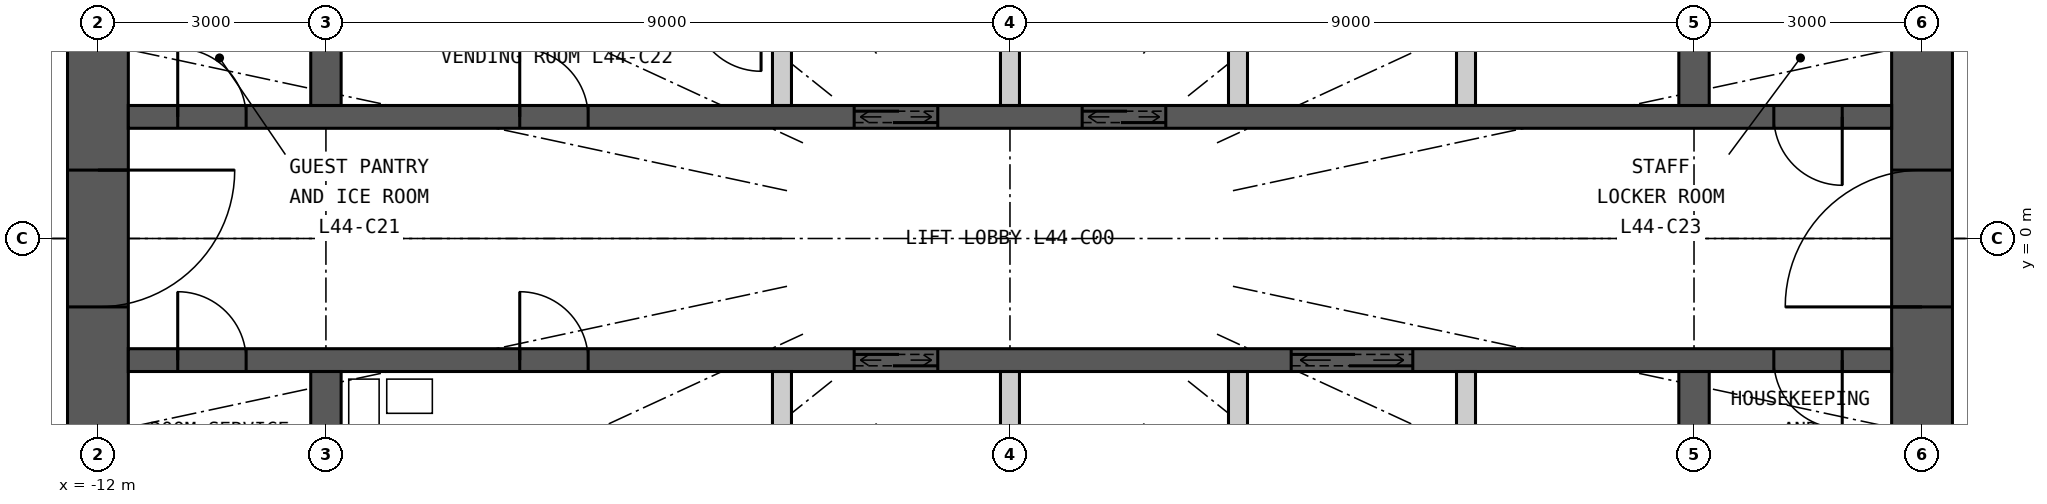
"""IFC4 building model, lengths in metres.
Left out: names, types, materials, properties, quantities, classifications, styles, units other than length and angle.
Written with IfcOpenShell. Run it as: python <this file> out.ifc"""

import sys

from ifc_helpers import new_model, si_unit, direction, frame, frame_2d, origin, place, context, subcontext, project, spatial, rectangle, extrude, element, fill, save


model = new_model("IFC4")
c1 = context("Model", 3, precision=1e-05, world=origin(), true_north=direction((0.0, 1.0)))
c2 = subcontext(c1, "Body", "Model", "MODEL_VIEW")
j1 = project(units=[si_unit("LENGTHUNIT", "METRE"), si_unit("PLANEANGLEUNIT", "RADIAN")], contexts=[c1])
p1 = place(None, origin())
s1 = spatial("IfcSite", under=j1, at=p1, CompositionType="ELEMENT")
p2 = place(p1, origin())
s2 = spatial("IfcBuilding", under=s1, at=p2, CompositionType="ELEMENT")
p3 = place(p2, frame((0.0, 0.0, 166.5)))
s3 = spatial("IfcBuildingStorey", under=s2, at=p3, CompositionType="ELEMENT", Elevation=166.5)
p4 = place(p3, frame((12.0, -7.6, 0.0), z_axis=(0.0, 0.0, 1.0), x_axis=(0.0, 1.0, 0.0)))
e1 = element("IfcWall", 1, at=p4, inside=s3, PredefinedType="SHEAR", context=c2, shape_type="SweptSolid", body=[
    extrude(rectangle(XDim=15.2, YDim=0.8, at=frame_2d((7.6, 0.0))), origin(), (0.0, 0.0, 1.0), 3.3),
])
p5 = place(p4, frame((6.7, 0.0, 0.0)))
e2 = element("IfcOpeningElement", 2, at=p5, cuts=e1, PredefinedType="OPENING", context=c2, shape_type="SweptSolid", body=[
    extrude(rectangle(XDim=1.8, YDim=2.2, at=frame_2d((0.9, 1.1))), frame((0.0, 0.41, 0.0), z_axis=(0.0, -1.0, 0.0), x_axis=(1.0, 0.0, 0.0)), (0.0, 0.0, 1.0), 0.82),
])
p6 = place(p3, frame((-12.0, 7.6, 0.0), z_axis=(0.0, 0.0, 1.0), x_axis=(0.0, -1.0, 0.0)))
e3 = element("IfcWall", 3, at=p6, inside=s3, PredefinedType="SHEAR", context=c2, shape_type="SweptSolid", body=[
    extrude(rectangle(XDim=15.2, YDim=0.8, at=frame_2d((7.6, 0.0))), origin(), (0.0, 0.0, 1.0), 3.3),
])
p7 = place(p6, frame((6.7, 0.0, 0.0)))
e4 = element("IfcOpeningElement", 4, at=p7, cuts=e3, PredefinedType="OPENING", context=c2, shape_type="SweptSolid", body=[
    extrude(rectangle(XDim=1.8, YDim=2.2, at=frame_2d((0.9, 1.1))), frame((0.0, 0.41, 0.0), z_axis=(0.0, -1.0, 0.0), x_axis=(1.0, 0.0, 0.0)), (0.0, 0.0, 1.0), 0.82),
])
p8 = place(p3, frame((-11.6, 1.6, 0.0), z_axis=(0.0, 0.0, 1.0), x_axis=(1.0, 0.0, 0.0)))
e5 = element("IfcWall", 5, at=p8, inside=s3, PredefinedType="SHEAR", context=c2, shape_type="SweptSolid", body=[
    extrude(rectangle(XDim=23.2, YDim=0.3, at=frame_2d((11.6, 0.0))), origin(), (0.0, 0.0, 1.0), 3.3),
])
p9 = place(p8, frame((9.55, 0.0, 0.0)))
e6 = element("IfcOpeningElement", 6, at=p9, cuts=e5, PredefinedType="OPENING", context=c2, shape_type="SweptSolid", body=[
    extrude(rectangle(XDim=1.1, YDim=2.2, at=frame_2d((0.55, 1.1))), frame((0.0, 0.16, 0.0), z_axis=(0.0, -1.0, 0.0), x_axis=(1.0, 0.0, 0.0)), (0.0, 0.0, 1.0), 0.32),
])
p10 = place(p8, frame((12.55, 0.0, 0.0)))
e7 = element("IfcOpeningElement", 7, at=p10, cuts=e5, PredefinedType="OPENING", context=c2, shape_type="SweptSolid", body=[
    extrude(rectangle(XDim=1.1, YDim=2.2, at=frame_2d((0.55, 1.1))), frame((0.0, 0.16, 0.0), z_axis=(0.0, -1.0, 0.0), x_axis=(1.0, 0.0, 0.0)), (0.0, 0.0, 1.0), 0.32),
])
p11 = place(p8, frame((0.65, 0.0, 0.0)))
e8 = element("IfcOpeningElement", 8, at=p11, cuts=e5, PredefinedType="OPENING", context=c2, shape_type="SweptSolid", body=[
    extrude(rectangle(XDim=0.9, YDim=2.2, at=frame_2d((0.45, 1.1))), frame((0.0, 0.16, 0.0), z_axis=(0.0, -1.0, 0.0), x_axis=(1.0, 0.0, 0.0)), (0.0, 0.0, 1.0), 0.32),
])
p12 = place(p8, frame((5.15, 0.0, 0.0)))
e9 = element("IfcOpeningElement", 9, at=p12, cuts=e5, PredefinedType="OPENING", context=c2, shape_type="SweptSolid", body=[
    extrude(rectangle(XDim=0.9, YDim=2.2, at=frame_2d((0.45, 1.1))), frame((0.0, 0.16, 0.0), z_axis=(0.0, -1.0, 0.0), x_axis=(1.0, 0.0, 0.0)), (0.0, 0.0, 1.0), 0.32),
])
p13 = place(p8, frame((21.65, 0.0, 0.0)))
e10 = element("IfcOpeningElement", 10, at=p13, cuts=e5, PredefinedType="OPENING", context=c2, shape_type="SweptSolid", body=[
    extrude(rectangle(XDim=0.9, YDim=2.2, at=frame_2d((0.45, 1.1))), frame((0.0, 0.16, 0.0), z_axis=(0.0, -1.0, 0.0), x_axis=(1.0, 0.0, 0.0)), (0.0, 0.0, 1.0), 0.32),
])
p14 = place(p3, frame((-11.6, -1.6, 0.0), z_axis=(0.0, 0.0, 1.0), x_axis=(1.0, 0.0, 0.0)))
e11 = element("IfcWall", 11, at=p14, inside=s3, PredefinedType="SHEAR", context=c2, shape_type="SweptSolid", body=[
    extrude(rectangle(XDim=23.2, YDim=0.3, at=frame_2d((11.6, 0.0))), origin(), (0.0, 0.0, 1.0), 3.3),
])
p15 = place(p14, frame((9.55, 0.0, 0.0)))
e12 = element("IfcOpeningElement", 12, at=p15, cuts=e11, PredefinedType="OPENING", context=c2, shape_type="SweptSolid", body=[
    extrude(rectangle(XDim=1.1, YDim=2.2, at=frame_2d((0.55, 1.1))), frame((0.0, 0.16, 0.0), z_axis=(0.0, -1.0, 0.0), x_axis=(1.0, 0.0, 0.0)), (0.0, 0.0, 1.0), 0.32),
])
p16 = place(p14, frame((15.3, 0.0, 0.0)))
e13 = element("IfcOpeningElement", 13, at=p16, cuts=e11, PredefinedType="OPENING", context=c2, shape_type="SweptSolid", body=[
    extrude(rectangle(XDim=1.6, YDim=2.4, at=frame_2d((0.8, 1.2))), frame((0.0, 0.16, 0.0), z_axis=(0.0, -1.0, 0.0), x_axis=(1.0, 0.0, 0.0)), (0.0, 0.0, 1.0), 0.32),
])
p17 = place(p14, frame((0.65, 0.0, 0.0)))
e14 = element("IfcOpeningElement", 14, at=p17, cuts=e11, PredefinedType="OPENING", context=c2, shape_type="SweptSolid", body=[
    extrude(rectangle(XDim=0.9, YDim=2.2, at=frame_2d((0.45, 1.1))), frame((0.0, 0.16, 0.0), z_axis=(0.0, -1.0, 0.0), x_axis=(1.0, 0.0, 0.0)), (0.0, 0.0, 1.0), 0.32),
])
p18 = place(p14, frame((5.15, 0.0, 0.0)))
e15 = element("IfcOpeningElement", 15, at=p18, cuts=e11, PredefinedType="OPENING", context=c2, shape_type="SweptSolid", body=[
    extrude(rectangle(XDim=0.9, YDim=2.2, at=frame_2d((0.45, 1.1))), frame((0.0, 0.16, 0.0), z_axis=(0.0, -1.0, 0.0), x_axis=(1.0, 0.0, 0.0)), (0.0, 0.0, 1.0), 0.32),
])
p19 = place(p14, frame((21.65, 0.0, 0.0)))
e16 = element("IfcOpeningElement", 16, at=p19, cuts=e11, PredefinedType="OPENING", context=c2, shape_type="SweptSolid", body=[
    extrude(rectangle(XDim=0.9, YDim=2.2, at=frame_2d((0.45, 1.1))), frame((0.0, 0.16, 0.0), z_axis=(0.0, -1.0, 0.0), x_axis=(1.0, 0.0, 0.0)), (0.0, 0.0, 1.0), 0.32),
])
for number, where, z_axis, x_axis in (
    (17, (-9.0, 1.75, 0.0), (0.0, 0.0, 1.0), (0.0, 1.0, 0.0)),
    (18, (-9.0, -4.1, 0.0), (0.0, 0.0, 1.0), (0.0, 1.0, 0.0)),
    (19, (9.0, 1.75, 0.0), (0.0, 0.0, 1.0), (0.0, 1.0, 0.0)),
    (20, (9.0, -4.1, 0.0), (0.0, 0.0, 1.0), (0.0, 1.0, 0.0)),
):
    element("IfcWall", number, at=place(p3, frame(where, z_axis=z_axis, x_axis=x_axis)), inside=s3, PredefinedType="SHEAR", context=c2, shape_type="SweptSolid", body=[
        extrude(rectangle(XDim=2.35, YDim=0.4, at=frame_2d((1.175, 0.0))), origin(), (0.0, 0.0, 1.0), 3.3),
    ])
for number, where, z_axis, x_axis in (
    (21, (-3.0, 1.75, 0.0), (0.0, 0.0, 1.0), (0.0, 1.0, 0.0)),
    (22, (0.0, 1.75, 0.0), (0.0, 0.0, 1.0), (0.0, 1.0, 0.0)),
    (23, (3.0, 1.75, 0.0), (0.0, 0.0, 1.0), (0.0, 1.0, 0.0)),
    (24, (6.0, 1.75, 0.0), (0.0, 0.0, 1.0), (0.0, 1.0, 0.0)),
    (25, (-3.0, -4.1, 0.0), (0.0, 0.0, 1.0), (0.0, 1.0, 0.0)),
    (26, (0.0, -4.1, 0.0), (0.0, 0.0, 1.0), (0.0, 1.0, 0.0)),
    (27, (3.0, -4.1, 0.0), (0.0, 0.0, 1.0), (0.0, 1.0, 0.0)),
    (28, (6.0, -4.1, 0.0), (0.0, 0.0, 1.0), (0.0, 1.0, 0.0)),
):
    element("IfcWall", number, at=place(p3, frame(where, z_axis=z_axis, x_axis=x_axis)), inside=s3, PredefinedType="PARTITIONING", context=c2, shape_type="SweptSolid", body=[
        extrude(rectangle(XDim=2.35, YDim=0.25, at=frame_2d((1.175, 0.0))), origin(), (0.0, 0.0, 1.0), 3.3),
    ])
p20 = place(p9, origin())
e29 = element("IfcDoor", 29, at=p20, inside=s3, OperationType="DOUBLE_DOOR_SLIDING", PredefinedType="DOOR", context=c2, shape_type="SweptSolid", body=[
    extrude(rectangle(XDim=1.1, YDim=2.2, at=frame_2d((0.55, 1.1))), frame((0.0, 0.025, 0.0), z_axis=(0.0, -1.0, 0.0), x_axis=(1.0, 0.0, 0.0)), (0.0, 0.0, 1.0), 0.05),
])
fill(e6, e29)
p21 = place(p10, origin())
e30 = element("IfcDoor", 30, at=p21, inside=s3, OperationType="DOUBLE_DOOR_SLIDING", PredefinedType="DOOR", context=c2, shape_type="SweptSolid", body=[
    extrude(rectangle(XDim=1.1, YDim=2.2, at=frame_2d((0.55, 1.1))), frame((0.0, 0.025, 0.0), z_axis=(0.0, -1.0, 0.0), x_axis=(1.0, 0.0, 0.0)), (0.0, 0.0, 1.0), 0.05),
])
fill(e7, e30)
p22 = place(p15, origin())
e31 = element("IfcDoor", 31, at=p22, inside=s3, OperationType="DOUBLE_DOOR_SLIDING", PredefinedType="DOOR", context=c2, shape_type="SweptSolid", body=[
    extrude(rectangle(XDim=1.1, YDim=2.2, at=frame_2d((0.55, 1.1))), frame((0.0, 0.025, 0.0), z_axis=(0.0, -1.0, 0.0), x_axis=(1.0, 0.0, 0.0)), (0.0, 0.0, 1.0), 0.05),
])
fill(e12, e31)
p23 = place(p16, origin())
e32 = element("IfcDoor", 32, at=p23, inside=s3, OperationType="DOUBLE_DOOR_SLIDING", PredefinedType="DOOR", context=c2, shape_type="SweptSolid", body=[
    extrude(rectangle(XDim=1.6, YDim=2.4, at=frame_2d((0.8, 1.2))), frame((0.0, 0.025, 0.0), z_axis=(0.0, -1.0, 0.0), x_axis=(1.0, 0.0, 0.0)), (0.0, 0.0, 1.0), 0.05),
])
fill(e13, e32)
p24 = place(p11, origin())
e33 = element("IfcDoor", 33, at=p24, inside=s3, OperationType="SINGLE_SWING_LEFT", PredefinedType="DOOR", context=c2, shape_type="SweptSolid", body=[
    extrude(rectangle(XDim=0.9, YDim=2.2, at=frame_2d((0.45, 1.1))), frame((0.0, 0.025, 0.0), z_axis=(0.0, -1.0, 0.0), x_axis=(1.0, 0.0, 0.0)), (0.0, 0.0, 1.0), 0.05),
])
fill(e8, e33)
p25 = place(p12, origin())
e34 = element("IfcDoor", 34, at=p25, inside=s3, OperationType="SINGLE_SWING_LEFT", PredefinedType="DOOR", context=c2, shape_type="SweptSolid", body=[
    extrude(rectangle(XDim=0.9, YDim=2.2, at=frame_2d((0.45, 1.1))), frame((0.0, 0.025, 0.0), z_axis=(0.0, -1.0, 0.0), x_axis=(1.0, 0.0, 0.0)), (0.0, 0.0, 1.0), 0.05),
])
fill(e9, e34)
p26 = place(p17, origin())
e35 = element("IfcDoor", 35, at=p26, inside=s3, OperationType="SINGLE_SWING_LEFT", PredefinedType="DOOR", context=c2, shape_type="SweptSolid", body=[
    extrude(rectangle(XDim=0.9, YDim=2.2, at=frame_2d((0.45, 1.1))), frame((0.0, 0.025, 0.0), z_axis=(0.0, -1.0, 0.0), x_axis=(1.0, 0.0, 0.0)), (0.0, 0.0, 1.0), 0.05),
])
fill(e14, e35)
p27 = place(p18, origin())
e36 = element("IfcDoor", 36, at=p27, inside=s3, OperationType="SINGLE_SWING_LEFT", PredefinedType="DOOR", context=c2, shape_type="SweptSolid", body=[
    extrude(rectangle(XDim=0.9, YDim=2.2, at=frame_2d((0.45, 1.1))), frame((0.0, 0.025, 0.0), z_axis=(0.0, -1.0, 0.0), x_axis=(1.0, 0.0, 0.0)), (0.0, 0.0, 1.0), 0.05),
])
fill(e15, e36)
p28 = place(p19, origin())
e37 = element("IfcDoor", 37, at=p28, inside=s3, OperationType="SINGLE_SWING_RIGHT", PredefinedType="DOOR", context=c2, shape_type="SweptSolid", body=[
    extrude(rectangle(XDim=0.9, YDim=2.2, at=frame_2d((0.45, 1.1))), frame((0.0, 0.025, 0.0), z_axis=(0.0, -1.0, 0.0), x_axis=(1.0, 0.0, 0.0)), (0.0, 0.0, 1.0), 0.05),
])
fill(e16, e37)
p29 = place(p13, origin())
e38 = element("IfcDoor", 38, at=p29, inside=s3, OperationType="SINGLE_SWING_RIGHT", PredefinedType="DOOR", context=c2, shape_type="SweptSolid", body=[
    extrude(rectangle(XDim=0.9, YDim=2.2, at=frame_2d((0.45, 1.1))), frame((0.0, 0.025, 0.0), z_axis=(0.0, -1.0, 0.0), x_axis=(1.0, 0.0, 0.0)), (0.0, 0.0, 1.0), 0.05),
])
fill(e10, e38)
p30 = place(p5, origin())
e39 = element("IfcDoor", 39, at=p30, inside=s3, OperationType="DOUBLE_DOOR_DOUBLE_SWING", PredefinedType="DOOR", context=c2, shape_type="SweptSolid", body=[
    extrude(rectangle(XDim=1.8, YDim=2.2, at=frame_2d((0.9, 1.1))), frame((0.0, 0.025, 0.0), z_axis=(0.0, -1.0, 0.0), x_axis=(1.0, 0.0, 0.0)), (0.0, 0.0, 1.0), 0.05),
])
fill(e2, e39)
p31 = place(p7, origin())
e40 = element("IfcDoor", 40, at=p31, inside=s3, OperationType="DOUBLE_DOOR_DOUBLE_SWING", PredefinedType="DOOR", context=c2, shape_type="SweptSolid", body=[
    extrude(rectangle(XDim=1.8, YDim=2.2, at=frame_2d((0.9, 1.1))), frame((0.0, 0.025, 0.0), z_axis=(0.0, -1.0, 0.0), x_axis=(1.0, 0.0, 0.0)), (0.0, 0.0, 1.0), 0.05),
])
fill(e4, e40)
save(model, sys.argv[1])
